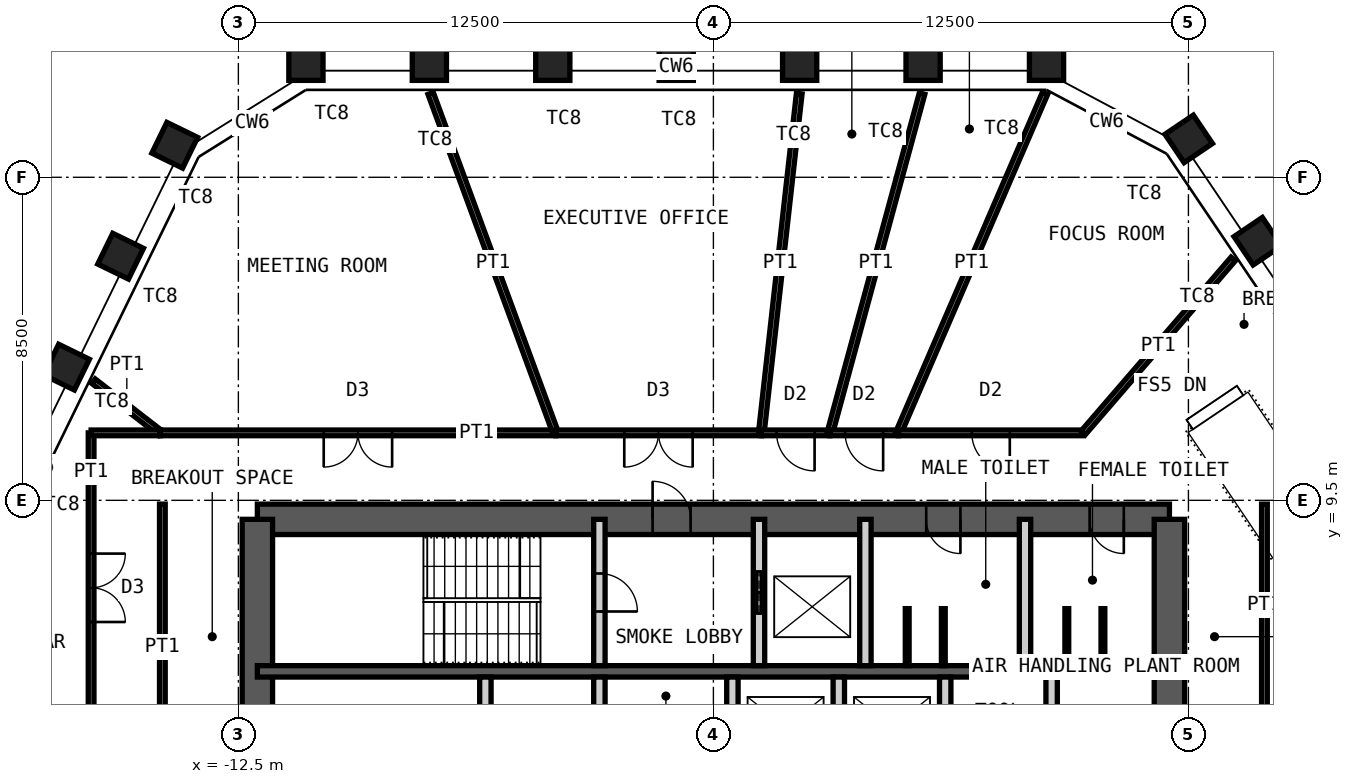
"""IFC4 building model, lengths in metres.
Left out: names, types, materials, properties, quantities, classifications, styles, units other than length and angle.
Written with IfcOpenShell. Run it as: python <this file> out.ifc"""

import sys

from ifc_helpers import new_model, si_unit, direction, frame, frame_2d, origin, origin_2d, place, context, subcontext, project, spatial, rectangle, hollow_rectangle, extrude, element, fill, save


model = new_model("IFC4")
c1 = context("Model", 3, precision=1e-05, world=origin(), true_north=direction((0.0, 1.0)))
c2 = subcontext(c1, "Body", "Model", "MODEL_VIEW")
j1 = project(units=[si_unit("LENGTHUNIT", "METRE"), si_unit("PLANEANGLEUNIT", "RADIAN")], contexts=[c1])
p1 = place(None, origin())
s1 = spatial("IfcSite", under=j1, at=p1, CompositionType="ELEMENT")
p2 = place(p1, origin())
s2 = spatial("IfcBuilding", under=s1, at=p2, CompositionType="ELEMENT")
p3 = place(p2, frame((0.0, 0.0, 329.2)))
s3 = spatial("IfcBuildingStorey", under=s2, at=p3, CompositionType="ELEMENT", Elevation=329.2)
for number, where, z_axis, x_axis in (
    (1, (-10.722, 21.0, 0.0), (0.0, 0.0, 1.0), (-1.0, 0.0, 0.0)),
    (2, (-7.474, 21.0, 0.0), (0.0, 0.0, 1.0), (-1.0, 0.0, 0.0)),
    (3, (-4.226, 21.0, 0.0), (0.0, 0.0, 1.0), (-1.0, 0.0, 0.0)),
    (4, (-0.978, 21.0, 0.0), (0.0, 0.0, 1.0), (-1.0, 0.0, 0.0)),
    (5, (2.27, 21.0, 0.0), (0.0, 0.0, 1.0), (-1.0, 0.0, 0.0)),
    (6, (5.518, 21.0, 0.0), (0.0, 0.0, 1.0), (-1.0, 0.0, 0.0)),
    (7, (8.766, 21.0, 0.0), (0.0, 0.0, 1.0), (-1.0, 0.0, 0.0)),
    (8, (12.508, 19.01, 0.0), (0.0, 0.0, 1.0), (-0.559, 0.829, 0.0)),
    (9, (14.324, 16.318, 0.0), (0.0, 0.0, 1.0), (-0.559, 0.829, 0.0)),
    (10, (-17.022, 13.004, 0.0), (0.0, 0.0, 1.0), (-0.438, -0.899, 0.0)),
    (11, (-15.598, 15.924, 0.0), (0.0, 0.0, 1.0), (-0.438, -0.899, 0.0)),
    (12, (-14.174, 18.843, 0.0), (0.0, 0.0, 1.0), (-0.438, -0.899, 0.0)),
):
    element("IfcColumn", number, at=place(p3, frame(where, z_axis=z_axis, x_axis=x_axis)), inside=s3, PredefinedType="COLUMN", context=c2, shape_type="SweptSolid", body=[
        extrude(hollow_rectangle(XDim=0.9, YDim=0.9, WallThickness=0.05, at=origin_2d()), origin(), (0.0, 0.0, 1.0), 4.2),
    ])
p4 = place(p3, frame((-12.0, 9.0, 0.0), z_axis=(0.0, 0.0, 1.0), x_axis=(1.0, 0.0, 0.0)))
e13 = element("IfcWall", 13, at=p4, inside=s3, PredefinedType="SHEAR", context=c2, shape_type="SweptSolid", body=[
    extrude(rectangle(XDim=24.0, YDim=0.8, at=frame_2d((12.0, 0.0))), origin(), (0.0, 0.0, 1.0), 4.2),
])
p5 = place(p4, frame((10.4, 0.0, 0.0)))
e14 = element("IfcOpeningElement", 14, at=p5, cuts=e13, PredefinedType="OPENING", context=c2, shape_type="SweptSolid", body=[
    extrude(rectangle(XDim=1.0, YDim=2.1, at=frame_2d((0.5, 1.05))), frame((0.0, 0.41, 0.0), z_axis=(0.0, -1.0, 0.0), x_axis=(1.0, 0.0, 0.0)), (0.0, 0.0, 1.0), 0.82),
])
p6 = place(p4, frame((17.6, 0.0, 0.0)))
e15 = element("IfcOpeningElement", 15, at=p6, cuts=e13, PredefinedType="OPENING", context=c2, shape_type="SweptSolid", body=[
    extrude(rectangle(XDim=0.9, YDim=2.1, at=frame_2d((0.45, 1.05))), frame((0.0, 0.41, 0.0), z_axis=(0.0, -1.0, 0.0), x_axis=(1.0, 0.0, 0.0)), (0.0, 0.0, 1.0), 0.82),
])
p7 = place(p4, frame((21.9, 0.0, 0.0)))
e16 = element("IfcOpeningElement", 16, at=p7, cuts=e13, PredefinedType="OPENING", context=c2, shape_type="SweptSolid", body=[
    extrude(rectangle(XDim=0.9, YDim=2.1, at=frame_2d((0.45, 1.05))), frame((0.0, 0.41, 0.0), z_axis=(0.0, -1.0, 0.0), x_axis=(1.0, 0.0, 0.0)), (0.0, 0.0, 1.0), 0.82),
])
p8 = place(p3, frame((12.0, -9.0, 0.0), z_axis=(0.0, 0.0, 1.0), x_axis=(0.0, 1.0, 0.0)))
e17 = element("IfcWall", 17, at=p8, inside=s3, PredefinedType="SHEAR", context=c2, shape_type="SweptSolid", body=[
    extrude(rectangle(XDim=18.0, YDim=0.8, at=frame_2d((9.0, 0.0))), origin(), (0.0, 0.0, 1.0), 4.2),
])
p9 = place(p8, frame((8.1, 0.0, 0.0)))
e18 = element("IfcOpeningElement", 18, at=p9, cuts=e17, PredefinedType="OPENING", context=c2, shape_type="SweptSolid", body=[
    extrude(rectangle(XDim=1.8, YDim=2.1, at=frame_2d((0.9, 1.05))), frame((0.0, 0.41, 0.0), z_axis=(0.0, -1.0, 0.0), x_axis=(1.0, 0.0, 0.0)), (0.0, 0.0, 1.0), 0.82),
])
p10 = place(p3, frame((-12.0, -9.0, 0.0), z_axis=(0.0, 0.0, 1.0), x_axis=(0.0, 1.0, 0.0)))
e19 = element("IfcWall", 19, at=p10, inside=s3, PredefinedType="SHEAR", context=c2, shape_type="SweptSolid", body=[
    extrude(rectangle(XDim=18.0, YDim=0.8, at=frame_2d((9.0, 0.0))), origin(), (0.0, 0.0, 1.0), 4.2),
])
p11 = place(p10, frame((8.1, 0.0, 0.0)))
e20 = element("IfcOpeningElement", 20, at=p11, cuts=e19, PredefinedType="OPENING", context=c2, shape_type="SweptSolid", body=[
    extrude(rectangle(XDim=1.8, YDim=2.1, at=frame_2d((0.9, 1.05))), frame((0.0, 0.41, 0.0), z_axis=(0.0, -1.0, 0.0), x_axis=(1.0, 0.0, 0.0)), (0.0, 0.0, 1.0), 0.82),
])
p12 = place(p3, frame((-12.0, 5.0, 0.0), z_axis=(0.0, 0.0, 1.0), x_axis=(1.0, 0.0, 0.0)))
e21 = element("IfcWall", 21, at=p12, inside=s3, PredefinedType="SHEAR", context=c2, shape_type="SweptSolid", body=[
    extrude(rectangle(XDim=24.0, YDim=0.3, at=frame_2d((12.0, 0.0))), origin(), (0.0, 0.0, 1.0), 4.2),
])
p13 = place(p3, frame((-3.0, 5.15, 0.0), z_axis=(0.0, 0.0, 1.0), x_axis=(0.0, 1.0, 0.0)))
e22 = element("IfcWall", 22, at=p13, inside=s3, PredefinedType="PARTITIONING", context=c2, shape_type="SweptSolid", body=[
    extrude(rectangle(XDim=3.85, YDim=0.3, at=frame_2d((1.925, 0.0))), origin(), (0.0, 0.0, 1.0), 3.98),
])
p14 = place(p13, frame((1.425, 0.0, 0.0)))
e23 = element("IfcOpeningElement", 23, at=p14, cuts=e22, PredefinedType="OPENING", context=c2, shape_type="SweptSolid", body=[
    extrude(rectangle(XDim=1.0, YDim=2.1, at=frame_2d((0.5, 1.05))), frame((0.0, 0.16, 0.0), z_axis=(0.0, -1.0, 0.0), x_axis=(1.0, 0.0, 0.0)), (0.0, 0.0, 1.0), 0.32),
])
p15 = place(p3, frame((1.2, 5.15, 0.0), z_axis=(0.0, 0.0, 1.0), x_axis=(0.0, 1.0, 0.0)))
e24 = element("IfcWall", 24, at=p15, inside=s3, PredefinedType="PARTITIONING", context=c2, shape_type="SweptSolid", body=[
    extrude(rectangle(XDim=3.85, YDim=0.3, at=frame_2d((1.925, 0.0))), origin(), (0.0, 0.0, 1.0), 3.98),
])
p16 = place(p15, frame((1.375, 0.0, 0.0)))
e25 = element("IfcOpeningElement", 25, at=p16, cuts=e24, PredefinedType="OPENING", context=c2, shape_type="SweptSolid", body=[
    extrude(rectangle(XDim=1.1, YDim=2.4, at=frame_2d((0.55, 1.2))), frame((0.0, 0.16, 0.0), z_axis=(0.0, -1.0, 0.0), x_axis=(1.0, 0.0, 0.0)), (0.0, 0.0, 1.0), 0.32),
])
for number, where, z_axis, x_axis in (
    (26, (4.0, 5.15, 0.0), (0.0, 0.0, 1.0), (0.0, 1.0, 0.0)),
    (27, (8.2, 5.15, 0.0), (0.0, 0.0, 1.0), (0.0, 1.0, 0.0)),
):
    element("IfcWall", number, at=place(p3, frame(where, z_axis=z_axis, x_axis=x_axis)), inside=s3, PredefinedType="PARTITIONING", context=c2, shape_type="SweptSolid", body=[
        extrude(rectangle(XDim=3.85, YDim=0.3, at=frame_2d((1.925, 0.0))), origin(), (0.0, 0.0, 1.0), 3.98),
    ])
for number, where, z_axis, x_axis in (
    (28, (-6.0, 2.2, 0.0), (0.0, 0.0, 1.0), (0.0, 1.0, 0.0)),
    (29, (-3.0, 2.2, 0.0), (0.0, 0.0, 1.0), (0.0, 1.0, 0.0)),
    (30, (0.5, 2.2, 0.0), (0.0, 0.0, 1.0), (0.0, 1.0, 0.0)),
    (31, (3.3, 2.2, 0.0), (0.0, 0.0, 1.0), (0.0, 1.0, 0.0)),
    (32, (6.1, 2.2, 0.0), (0.0, 0.0, 1.0), (0.0, 1.0, 0.0)),
    (33, (8.9, 2.2, 0.0), (0.0, 0.0, 1.0), (0.0, 1.0, 0.0)),
):
    element("IfcWall", number, at=place(p3, frame(where, z_axis=z_axis, x_axis=x_axis)), inside=s3, PredefinedType="PARTITIONING", context=c2, shape_type="SweptSolid", body=[
        extrude(rectangle(XDim=2.65, YDim=0.3, at=frame_2d((1.325, 0.0))), origin(), (0.0, 0.0, 1.0), 3.98),
    ])
for number, where, z_axis, x_axis in (
    (34, (5.1, 5.15, 0.0), (0.0, 0.0, 1.0), (0.0, 1.0, 0.0)),
    (35, (6.05, 5.15, 0.0), (0.0, 0.0, 1.0), (0.0, 1.0, 0.0)),
    (36, (9.3, 5.15, 0.0), (0.0, 0.0, 1.0), (0.0, 1.0, 0.0)),
    (37, (10.25, 5.15, 0.0), (0.0, 0.0, 1.0), (0.0, 1.0, 0.0)),
):
    element("IfcWall", number, at=place(p3, frame(where, z_axis=z_axis, x_axis=x_axis)), inside=s3, PredefinedType="PARTITIONING", context=c2, shape_type="SweptSolid", body=[
        extrude(rectangle(XDim=1.5, YDim=0.1, at=frame_2d((0.75, 0.0))), origin(), (0.0, 0.0, 1.0), 2.1),
    ])
p17 = place(p3, frame((-16.314, 12.636, 0.0), z_axis=(0.0, 0.0, 1.0), x_axis=(0.790545318909, -0.612403542406, 0.0)))
e38 = element("IfcWall", 38, at=p17, inside=s3, PredefinedType="PARTITIONING", context=c2, shape_type="SweptSolid", body=[
    extrude(rectangle(XDim=2.223, YDim=0.15, at=frame_2d((1.111, 0.0))), origin(), (0.0, 0.0, 1.0), 3.33),
])
p18 = place(p3, frame((-14.556, 11.275, 0.0), z_axis=(0.0, 0.0, 1.0), x_axis=(1.0, 0.0, 0.0)))
e39 = element("IfcWall", 39, at=p18, inside=s3, PredefinedType="PARTITIONING", context=c2, shape_type="SweptSolid", body=[
    extrude(rectangle(XDim=10.405, YDim=0.15, at=frame_2d((5.203, 0.0))), origin(), (0.0, 0.0, 1.0), 4.03),
])
p19 = place(p18, frame((4.302, 0.0, 0.0)))
e40 = element("IfcOpeningElement", 40, at=p19, cuts=e39, PredefinedType="OPENING", context=c2, shape_type="SweptSolid", body=[
    extrude(rectangle(XDim=1.8, YDim=2.4, at=frame_2d((0.9, 1.2))), frame((0.0, 0.085, 0.0), z_axis=(0.0, -1.0, 0.0), x_axis=(1.0, 0.0, 0.0)), (0.0, 0.0, 1.0), 0.17),
])
p20 = place(p3, frame((-7.44, 20.206, 0.0), z_axis=(0.0, 0.0, 1.0), x_axis=(0.345511582319, -0.93841448544, 0.0)))
e41 = element("IfcWall", 41, at=p20, inside=s3, PredefinedType="PARTITIONING", context=c2, shape_type="SweptSolid", body=[
    extrude(rectangle(XDim=9.517, YDim=0.15, at=frame_2d((4.759, 0.0))), origin(), (0.0, 0.0, 1.0), 3.33),
])
p21 = place(p3, frame((-4.151, 11.275, 0.0), z_axis=(0.0, 0.0, 1.0), x_axis=(1.0, 0.0, 0.0)))
e42 = element("IfcWall", 42, at=p21, inside=s3, PredefinedType="PARTITIONING", context=c2, shape_type="SweptSolid", body=[
    extrude(rectangle(XDim=5.412, YDim=0.15, at=frame_2d((2.706, 0.0))), origin(), (0.0, 0.0, 1.0), 4.03),
])
p22 = place(p21, frame((1.806, 0.0, 0.0)))
e43 = element("IfcOpeningElement", 43, at=p22, cuts=e42, PredefinedType="OPENING", context=c2, shape_type="SweptSolid", body=[
    extrude(rectangle(XDim=1.8, YDim=2.4, at=frame_2d((0.9, 1.2))), frame((0.0, 0.085, 0.0), z_axis=(0.0, -1.0, 0.0), x_axis=(1.0, 0.0, 0.0)), (0.0, 0.0, 1.0), 0.17),
])
p23 = place(p3, frame((2.259, 20.201, 0.0), z_axis=(0.0, 0.0, 1.0), x_axis=(-0.111123668582, -0.993806585952, 0.0)))
e44 = element("IfcWall", 44, at=p23, inside=s3, PredefinedType="PARTITIONING", context=c2, shape_type="SweptSolid", body=[
    extrude(rectangle(XDim=8.981, YDim=0.15, at=frame_2d((4.491, 0.0))), origin(), (0.0, 0.0, 1.0), 3.33),
])
p24 = place(p3, frame((1.261, 11.275, 0.0), z_axis=(0.0, 0.0, 1.0), x_axis=(1.0, 0.0, 0.0)))
e45 = element("IfcWall", 45, at=p24, inside=s3, PredefinedType="PARTITIONING", context=c2, shape_type="SweptSolid", body=[
    extrude(rectangle(XDim=1.804, YDim=0.15, at=frame_2d((0.902, 0.0))), origin(), (0.0, 0.0, 1.0), 4.03),
])
p25 = place(p24, frame((0.402, 0.0, 0.0)))
e46 = element("IfcOpeningElement", 46, at=p25, cuts=e45, PredefinedType="OPENING", context=c2, shape_type="SweptSolid", body=[
    extrude(rectangle(XDim=1.0, YDim=2.4, at=frame_2d((0.5, 1.2))), frame((0.0, 0.085, 0.0), z_axis=(0.0, -1.0, 0.0), x_axis=(1.0, 0.0, 0.0)), (0.0, 0.0, 1.0), 0.17),
])
p26 = place(p3, frame((5.492, 20.204, 0.0), z_axis=(0.0, 0.0, 1.0), x_axis=(-0.262302393053, -0.964985727666, 0.0)))
e47 = element("IfcWall", 47, at=p26, inside=s3, PredefinedType="PARTITIONING", context=c2, shape_type="SweptSolid", body=[
    extrude(rectangle(XDim=9.253, YDim=0.15, at=frame_2d((4.626, 0.0))), origin(), (0.0, 0.0, 1.0), 3.33),
])
p27 = place(p3, frame((3.065, 11.275, 0.0), z_axis=(0.0, 0.0, 1.0), x_axis=(1.0, 0.0, 0.0)))
e48 = element("IfcWall", 48, at=p27, inside=s3, PredefinedType="PARTITIONING", context=c2, shape_type="SweptSolid", body=[
    extrude(rectangle(XDim=1.804, YDim=0.15, at=frame_2d((0.902, 0.0))), origin(), (0.0, 0.0, 1.0), 4.03),
])
p28 = place(p27, frame((0.402, 0.0, 0.0)))
e49 = element("IfcOpeningElement", 49, at=p28, cuts=e48, PredefinedType="OPENING", context=c2, shape_type="SweptSolid", body=[
    extrude(rectangle(XDim=1.0, YDim=2.4, at=frame_2d((0.5, 1.2))), frame((0.0, 0.085, 0.0), z_axis=(0.0, -1.0, 0.0), x_axis=(1.0, 0.0, 0.0)), (0.0, 0.0, 1.0), 0.17),
])
p29 = place(p3, frame((8.726, 20.208, 0.0), z_axis=(0.0, 0.0, 1.0), x_axis=(-0.39644322536, -0.918059240499, 0.0)))
e50 = element("IfcWall", 50, at=p29, inside=s3, PredefinedType="PARTITIONING", context=c2, shape_type="SweptSolid", body=[
    extrude(rectangle(XDim=9.731, YDim=0.15, at=frame_2d((4.865, 0.0))), origin(), (0.0, 0.0, 1.0), 2.93),
])
p30 = place(p3, frame((4.869, 11.275, 0.0), z_axis=(0.0, 0.0, 1.0), x_axis=(1.0, 0.0, 0.0)))
e51 = element("IfcWall", 51, at=p30, inside=s3, PredefinedType="PARTITIONING", context=c2, shape_type="SweptSolid", body=[
    extrude(rectangle(XDim=4.861, YDim=0.15, at=frame_2d((2.431, 0.0))), origin(), (0.0, 0.0, 1.0), 4.03),
])
p31 = place(p30, frame((1.931, 0.0, 0.0)))
e52 = element("IfcOpeningElement", 52, at=p31, cuts=e51, PredefinedType="OPENING", context=c2, shape_type="SweptSolid", body=[
    extrude(rectangle(XDim=1.0, YDim=2.4, at=frame_2d((0.5, 1.2))), frame((0.0, 0.085, 0.0), z_axis=(0.0, -1.0, 0.0), x_axis=(1.0, 0.0, 0.0)), (0.0, 0.0, 1.0), 0.17),
])
p32 = place(p3, frame((13.678, 15.85, 0.0), z_axis=(0.0, 0.0, 1.0), x_axis=(-0.65333269737, -0.757070925704, 0.0)))
e53 = element("IfcWall", 53, at=p32, inside=s3, PredefinedType="PARTITIONING", context=c2, shape_type="SweptSolid", body=[
    extrude(rectangle(XDim=6.044, YDim=0.15, at=frame_2d((3.022, 0.0))), origin(), (0.0, 0.0, 1.0), 3.33),
])
p33 = place(p3, frame((-16.375, 3.122, 0.0), z_axis=(0.0, 0.0, 1.0), x_axis=(0.0, 1.0, 0.0)))
e54 = element("IfcWall", 54, at=p33, inside=s3, PredefinedType="PARTITIONING", context=c2, shape_type="SweptSolid", body=[
    extrude(rectangle(XDim=8.153, YDim=0.15, at=frame_2d((4.077, 0.0))), origin(), (0.0, 0.0, 1.0), 4.03),
])
p34 = place(p33, frame((3.177, 0.0, 0.0)))
e55 = element("IfcOpeningElement", 55, at=p34, cuts=e54, PredefinedType="OPENING", context=c2, shape_type="SweptSolid", body=[
    extrude(rectangle(XDim=1.8, YDim=2.4, at=frame_2d((0.9, 1.2))), frame((0.0, 0.085, 0.0), z_axis=(0.0, -1.0, 0.0), x_axis=(1.0, 0.0, 0.0)), (0.0, 0.0, 1.0), 0.17),
])
p35 = place(p3, frame((-16.375, 11.275, 0.0), z_axis=(0.0, 0.0, 1.0), x_axis=(1.0, 0.0, 0.0)))
e56 = element("IfcWall", 56, at=p35, inside=s3, PredefinedType="PARTITIONING", context=c2, shape_type="SweptSolid", body=[
    extrude(rectangle(XDim=1.819, YDim=0.15, at=frame_2d((0.909, 0.0))), origin(), (0.0, 0.0, 1.0), 4.03),
])
for number, where, z_axis, x_axis in (
    (57, (14.5, 1.9, 0.0), (0.0, 0.0, 1.0), (0.0, 1.0, 0.0)),
    (58, (-14.5, 1.9, 0.0), (0.0, 0.0, 1.0), (0.0, 1.0, 0.0)),
):
    element("IfcWall", number, at=place(p3, frame(where, z_axis=z_axis, x_axis=x_axis)), inside=s3, PredefinedType="PARTITIONING", context=c2, shape_type="SweptSolid", body=[
        extrude(rectangle(XDim=7.5, YDim=0.15, at=frame_2d((3.75, 0.0))), origin(), (0.0, 0.0, 1.0), 4.03),
    ])
p36 = place(p5, origin())
e59 = element("IfcDoor", 59, at=p36, inside=s3, OperationType="SINGLE_SWING_RIGHT", PredefinedType="DOOR", context=c2, shape_type="SweptSolid", body=[
    extrude(rectangle(XDim=1.0, YDim=2.1, at=frame_2d((0.5, 1.05))), frame((0.0, 0.025, 0.0), z_axis=(0.0, -1.0, 0.0), x_axis=(1.0, 0.0, 0.0)), (0.0, 0.0, 1.0), 0.05),
])
fill(e14, e59)
p37 = place(p6, origin())
e60 = element("IfcDoor", 60, at=p37, inside=s3, OperationType="SINGLE_SWING_RIGHT", PredefinedType="DOOR", context=c2, shape_type="SweptSolid", body=[
    extrude(rectangle(XDim=0.9, YDim=2.1, at=frame_2d((0.45, 1.05))), frame((0.0, 0.025, 0.0), z_axis=(0.0, -1.0, 0.0), x_axis=(1.0, 0.0, 0.0)), (0.0, 0.0, 1.0), 0.05),
])
fill(e15, e60)
p38 = place(p7, origin())
e61 = element("IfcDoor", 61, at=p38, inside=s3, OperationType="SINGLE_SWING_RIGHT", PredefinedType="DOOR", context=c2, shape_type="SweptSolid", body=[
    extrude(rectangle(XDim=0.9, YDim=2.1, at=frame_2d((0.45, 1.05))), frame((0.0, 0.025, 0.0), z_axis=(0.0, -1.0, 0.0), x_axis=(1.0, 0.0, 0.0)), (0.0, 0.0, 1.0), 0.05),
])
fill(e16, e61)
p39 = place(p14, origin())
e62 = element("IfcDoor", 62, at=p39, inside=s3, OperationType="SINGLE_SWING_LEFT", PredefinedType="DOOR", context=c2, shape_type="SweptSolid", body=[
    extrude(rectangle(XDim=1.0, YDim=2.1, at=frame_2d((0.5, 1.05))), frame((0.0, 0.025, 0.0), z_axis=(0.0, -1.0, 0.0), x_axis=(1.0, 0.0, 0.0)), (0.0, 0.0, 1.0), 0.05),
])
fill(e23, e62)
p40 = place(p16, origin())
e63 = element("IfcDoor", 63, at=p40, inside=s3, OperationType="DOUBLE_DOOR_SLIDING", PredefinedType="DOOR", context=c2, shape_type="SweptSolid", body=[
    extrude(rectangle(XDim=1.1, YDim=2.4, at=frame_2d((0.55, 1.2))), frame((0.0, 0.025, 0.0), z_axis=(0.0, -1.0, 0.0), x_axis=(1.0, 0.0, 0.0)), (0.0, 0.0, 1.0), 0.05),
])
fill(e25, e63)
p41 = place(p19, origin())
e64 = element("IfcDoor", 64, at=p41, inside=s3, OperationType="DOUBLE_DOOR_DOUBLE_SWING", PredefinedType="DOOR", context=c2, shape_type="SweptSolid", body=[
    extrude(rectangle(XDim=1.8, YDim=2.4, at=frame_2d((0.9, 1.2))), frame((0.0, 0.025, 0.0), z_axis=(0.0, -1.0, 0.0), x_axis=(1.0, 0.0, 0.0)), (0.0, 0.0, 1.0), 0.05),
])
fill(e40, e64)
p42 = place(p22, origin())
e65 = element("IfcDoor", 65, at=p42, inside=s3, OperationType="DOUBLE_DOOR_DOUBLE_SWING", PredefinedType="DOOR", context=c2, shape_type="SweptSolid", body=[
    extrude(rectangle(XDim=1.8, YDim=2.4, at=frame_2d((0.9, 1.2))), frame((0.0, 0.025, 0.0), z_axis=(0.0, -1.0, 0.0), x_axis=(1.0, 0.0, 0.0)), (0.0, 0.0, 1.0), 0.05),
])
fill(e43, e65)
p43 = place(p25, origin())
e66 = element("IfcDoor", 66, at=p43, inside=s3, OperationType="SINGLE_SWING_RIGHT", PredefinedType="DOOR", context=c2, shape_type="SweptSolid", body=[
    extrude(rectangle(XDim=1.0, YDim=2.4, at=frame_2d((0.5, 1.2))), frame((0.0, 0.025, 0.0), z_axis=(0.0, -1.0, 0.0), x_axis=(1.0, 0.0, 0.0)), (0.0, 0.0, 1.0), 0.05),
])
fill(e46, e66)
p44 = place(p28, origin())
e67 = element("IfcDoor", 67, at=p44, inside=s3, OperationType="SINGLE_SWING_RIGHT", PredefinedType="DOOR", context=c2, shape_type="SweptSolid", body=[
    extrude(rectangle(XDim=1.0, YDim=2.4, at=frame_2d((0.5, 1.2))), frame((0.0, 0.025, 0.0), z_axis=(0.0, -1.0, 0.0), x_axis=(1.0, 0.0, 0.0)), (0.0, 0.0, 1.0), 0.05),
])
fill(e49, e67)
p45 = place(p31, origin())
e68 = element("IfcDoor", 68, at=p45, inside=s3, OperationType="SINGLE_SWING_RIGHT", PredefinedType="DOOR", context=c2, shape_type="SweptSolid", body=[
    extrude(rectangle(XDim=1.0, YDim=2.4, at=frame_2d((0.5, 1.2))), frame((0.0, 0.025, 0.0), z_axis=(0.0, -1.0, 0.0), x_axis=(1.0, 0.0, 0.0)), (0.0, 0.0, 1.0), 0.05),
])
fill(e52, e68)
p46 = place(p34, origin())
e69 = element("IfcDoor", 69, at=p46, inside=s3, OperationType="DOUBLE_DOOR_DOUBLE_SWING", PredefinedType="DOOR", context=c2, shape_type="SweptSolid", body=[
    extrude(rectangle(XDim=1.8, YDim=2.4, at=frame_2d((0.9, 1.2))), frame((0.0, 0.025, 0.0), z_axis=(0.0, -1.0, 0.0), x_axis=(1.0, 0.0, 0.0)), (0.0, 0.0, 1.0), 0.05),
])
fill(e55, e69)
save(model, sys.argv[1])
